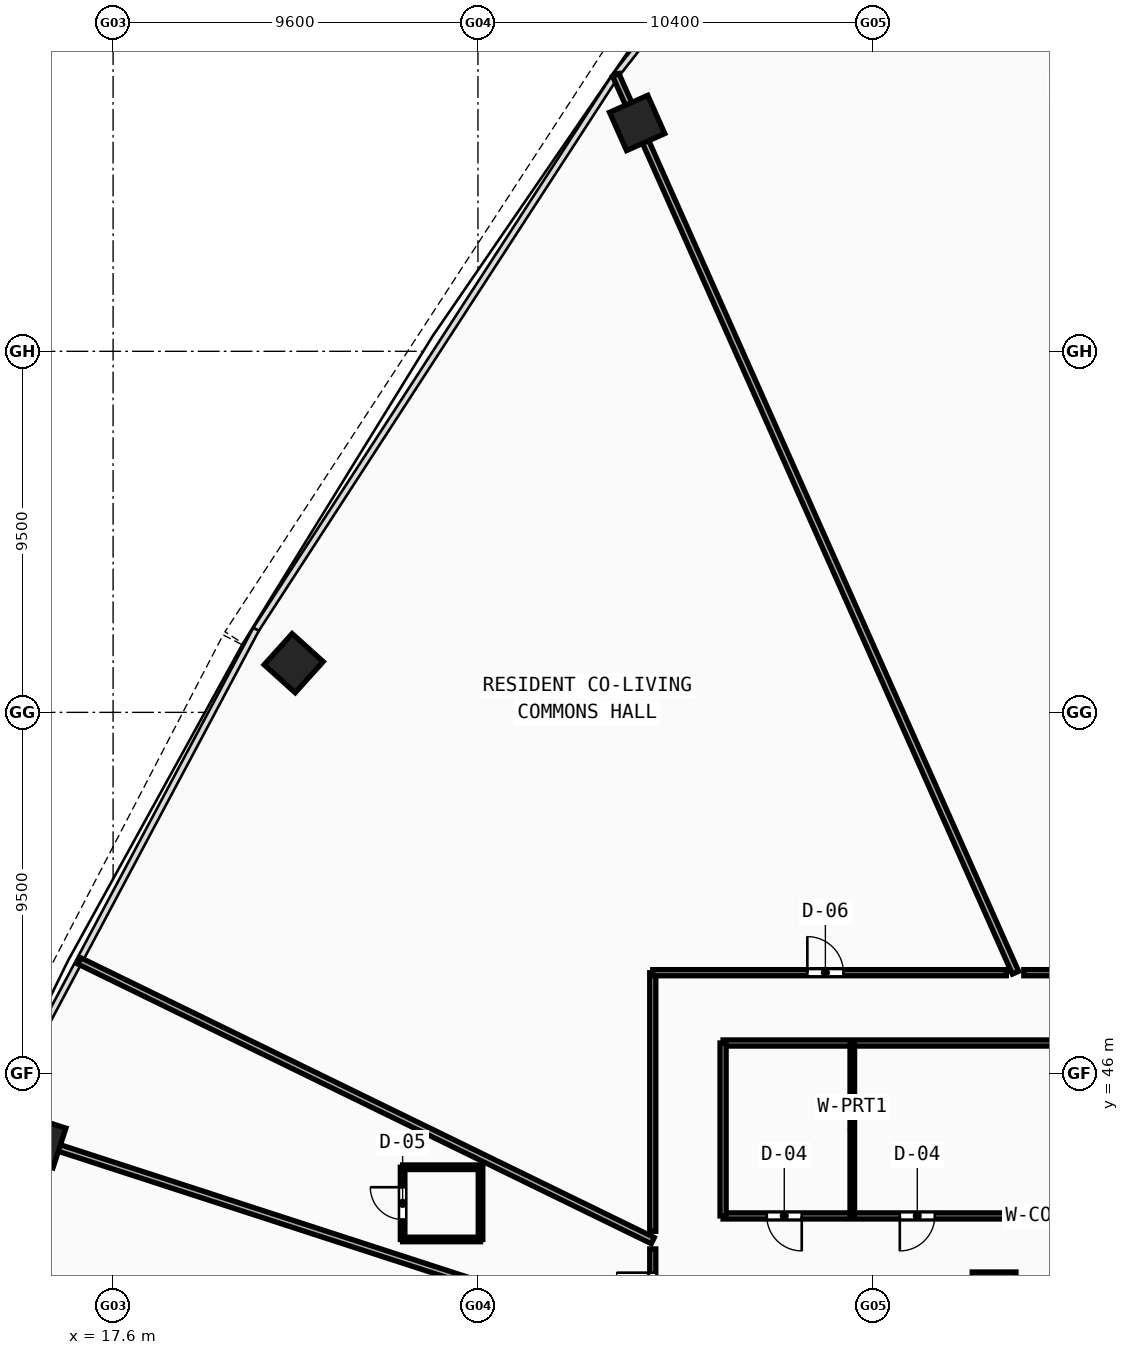
"""IFC4 building model, lengths in metres.
Left out: names, types, materials, properties, quantities, classifications, styles, units other than length and angle.
Written with IfcOpenShell. Run it as: python <this file> out.ifc"""

import sys

from ifc_helpers import new_model, si_unit, direction, frame, frame_2d, origin, origin_with_axes, origin_2d, place, context, subcontext, project, spatial, rectangle, hollow_rectangle, extrude, source, transform, mapped, element, fill, save


model = new_model("IFC4")
c1 = context("Model", 3, precision=1e-05, world=origin(), true_north=direction((0.0, 1.0)))
c2 = subcontext(c1, "Body", "Model", "MODEL_VIEW")
j1 = project(units=[si_unit("LENGTHUNIT", "METRE"), si_unit("PLANEANGLEUNIT", "RADIAN")], contexts=[c1])
p1 = place(None, origin())
s1 = spatial("IfcSite", under=j1, at=p1, CompositionType="ELEMENT")
p2 = place(p1, origin())
s2 = spatial("IfcBuilding", under=s1, at=p2, CompositionType="ELEMENT")
p3 = place(p2, frame((0.0, 0.0, 55.81)))
s3 = spatial("IfcBuildingStorey", under=s2, at=p3, CompositionType="ELEMENT", Elevation=55.81)
m1 = source(origin(), c2, "Body", "SweptSolid", [
    extrude(hollow_rectangle(XDim=1.15, YDim=1.15, WallThickness=0.048, at=origin_2d()), origin(), (0.0, 0.0, 1.0), 3.63),
])
p4 = place(p3, frame((40.781, 40.2, -0.26), z_axis=(0.0, 0.0, 1.0), x_axis=(1.0, 0.0, 0.0)))
e1 = element("IfcColumn", 1, at=p4, inside=s3, PredefinedType="COLUMN", context=c2, shape_type="MappedRepresentation", body=[
    mapped(m1, transform((0.0, 0.0, 0.0), scale=1.0)),
])
m2 = source(origin(), c2, "Body", "SweptSolid", [
    extrude(hollow_rectangle(XDim=1.1, YDim=1.1, WallThickness=0.045, at=origin_2d()), origin(), (0.0, 0.0, 1.0), 3.63),
])
for number, where, z_axis, x_axis in (
    (2, (31.389, 71.009, -0.26), (0.0, 0.0, 1.0), (-0.914, -0.407, 0.0)),
    (3, (22.351, 56.794, -0.26), (0.0, 0.0, 1.0), (-0.669, -0.743, 0.0)),
    (4, (15.665, 44.206, -0.26), (0.0, 0.0, 1.0), (-0.309, -0.951, 0.0)),
):
    element("IfcColumn", number, at=place(p3, frame(where, z_axis=z_axis, x_axis=x_axis)), inside=s3, PredefinedType="COLUMN", context=c2, shape_type="MappedRepresentation", body=[
        mapped(m2, transform((0.0, 0.0, 0.0), scale=1.0)),
    ])
p5 = place(p3, frame((33.65, 42.25, 0.0), z_axis=(0.0, 0.0, 1.0), x_axis=(1.0, 0.0, 0.0)))
e5 = element("IfcWall", 5, at=p5, inside=s3, PredefinedType="PARTITIONING", context=c2, shape_type="SweptSolid", body=[
    extrude(rectangle(XDim=10.23, YDim=0.16, at=frame_2d((5.115, 0.0))), origin(), (0.0, 0.0, 1.0), 2.67),
])
p6 = place(p5, frame((1.15, 0.0, 0.0)))
e6 = element("IfcOpeningElement", 6, at=p6, cuts=e5, PredefinedType="OPENING", context=c2, shape_type="SweptSolid", body=[
    extrude(rectangle(XDim=0.92, YDim=2.1, at=frame_2d((0.46, 1.05))), frame((0.0, 0.09, 0.0), z_axis=(0.0, -1.0, 0.0), x_axis=(1.0, 0.0, 0.0)), (0.0, 0.0, 1.0), 0.18),
])
p7 = place(p5, frame((4.65, 0.0, 0.0)))
e7 = element("IfcOpeningElement", 7, at=p7, cuts=e5, PredefinedType="OPENING", context=c2, shape_type="SweptSolid", body=[
    extrude(rectangle(XDim=0.92, YDim=2.1, at=frame_2d((0.46, 1.05))), frame((0.0, 0.09, 0.0), z_axis=(0.0, -1.0, 0.0), x_axis=(1.0, 0.0, 0.0)), (0.0, 0.0, 1.0), 0.18),
])
p8 = place(p3, frame((33.65, 46.8, 0.0), z_axis=(0.0, 0.0, 1.0), x_axis=(1.0, 0.0, 0.0)))
e8 = element("IfcWall", 8, at=p8, inside=s3, PredefinedType="PARTITIONING", context=c2, shape_type="SweptSolid", body=[
    extrude(rectangle(XDim=10.23, YDim=0.16, at=frame_2d((5.115, 0.0))), origin(), (0.0, 0.0, 1.0), 2.67),
])
p9 = place(p3, frame((33.65, 42.25, 0.0), z_axis=(0.0, 0.0, 1.0), x_axis=(0.0, 1.0, 0.0)))
e9 = element("IfcWall", 9, at=p9, inside=s3, PredefinedType="PARTITIONING", context=c2, shape_type="SweptSolid", body=[
    extrude(rectangle(XDim=4.55, YDim=0.16, at=frame_2d((2.275, 0.0))), origin(), (0.0, 0.0, 1.0), 2.67),
])
p10 = place(p3, frame((37.05, 42.25, 0.0), z_axis=(0.0, 0.0, 1.0), x_axis=(0.0, 1.0, 0.0)))
e10 = element("IfcWall", 10, at=p10, inside=s3, PredefinedType="PARTITIONING", context=c2, shape_type="SweptSolid", body=[
    extrude(rectangle(XDim=4.55, YDim=0.12, at=frame_2d((2.275, 0.0))), origin(), (0.0, 0.0, 1.0), 2.67),
])
p11 = place(p3, frame((41.344, 48.65, 0.0), z_axis=(0.0, 0.0, 1.0), x_axis=(-0.406729800422, 0.913548504158, 0.0)))
e11 = element("IfcWall", 11, at=p11, inside=s3, PredefinedType="PARTITIONING", context=c2, shape_type="SweptSolid", body=[
    extrude(rectangle(XDim=25.854, YDim=0.18, at=frame_2d((12.927, 0.0))), origin(), (0.0, 0.0, 1.0), 2.67),
])
p12 = place(p3, frame((31.8, 41.601, 0.0), z_axis=(0.0, 0.0, 1.0), x_axis=(-0.898795978277, 0.438367185625, 0.0)))
e12 = element("IfcWall", 12, at=p12, inside=s3, PredefinedType="PARTITIONING", context=c2, shape_type="SweptSolid", body=[
    extrude(rectangle(XDim=16.788, YDim=0.18, at=frame_2d((8.394, 0.0))), origin(), (0.0, 0.0, 1.0), 2.67),
])
p13 = place(p3, frame((31.8, 38.964, 0.0), z_axis=(0.0, 0.0, 1.0), x_axis=(-0.951052304058, 0.309029958006, 0.0)))
e13 = element("IfcWall", 13, at=p13, inside=s3, PredefinedType="PARTITIONING", context=c2, shape_type="SweptSolid", body=[
    extrude(rectangle(XDim=18.299, YDim=0.18, at=frame_2d((9.149, 0.0))), origin(), (0.0, 0.0, 1.0), 2.67),
])
p14 = place(p3, frame((31.8, 39.195, 0.0), z_axis=(0.0, 0.0, 1.0), x_axis=(0.0, 1.0, 0.0)))
e14 = element("IfcWall", 14, at=p14, inside=s3, PredefinedType="PARTITIONING", context=c2, shape_type="SweptSolid", body=[
    extrude(rectangle(XDim=2.187, YDim=0.16, at=frame_2d((1.093, 0.0))), origin(), (0.0, 0.0, 1.0), 3.37),
])
p15 = place(p14, frame((0.613, 0.0, 0.0)))
e15 = element("IfcOpeningElement", 15, at=p15, cuts=e14, PredefinedType="OPENING", context=c2, shape_type="SweptSolid", body=[
    extrude(rectangle(XDim=0.95, YDim=2.1, at=frame_2d((0.475, 1.05))), frame((0.0, 0.09, 0.0), z_axis=(0.0, -1.0, 0.0), x_axis=(1.0, 0.0, 0.0)), (0.0, 0.0, 1.0), 0.18),
])
p16 = place(p3, frame((31.8, 41.846, 0.0), z_axis=(0.0, 0.0, 1.0), x_axis=(0.0, 1.0, 0.0)))
e16 = element("IfcWall", 16, at=p16, inside=s3, PredefinedType="PARTITIONING", context=c2, shape_type="SweptSolid", body=[
    extrude(rectangle(XDim=6.804, YDim=0.16, at=frame_2d((3.402, 0.0))), origin(), (0.0, 0.0, 1.0), 2.67),
])
p17 = place(p3, frame((31.8, 48.65, 0.0), z_axis=(0.0, 0.0, 1.0), x_axis=(1.0, 0.0, 0.0)))
e17 = element("IfcWall", 17, at=p17, inside=s3, PredefinedType="PARTITIONING", context=c2, shape_type="SweptSolid", body=[
    extrude(rectangle(XDim=9.303, YDim=0.16, at=frame_2d((4.651, 0.0))), origin(), (0.0, 0.0, 1.0), 2.97),
])
p18 = place(p17, frame((4.067, 0.0, 0.0)))
e18 = element("IfcOpeningElement", 18, at=p18, cuts=e17, PredefinedType="OPENING", context=c2, shape_type="SweptSolid", body=[
    extrude(rectangle(XDim=0.95, YDim=2.1, at=frame_2d((0.475, 1.05))), frame((0.0, 0.09, 0.0), z_axis=(0.0, -1.0, 0.0), x_axis=(1.0, 0.0, 0.0)), (0.0, 0.0, 1.0), 0.18),
])
p19 = place(p3, frame((41.564, 48.65, 0.0), z_axis=(0.0, 0.0, 1.0), x_axis=(1.0, 0.0, 0.0)))
e19 = element("IfcWall", 19, at=p19, inside=s3, PredefinedType="PARTITIONING", context=c2, shape_type="SweptSolid", body=[
    extrude(rectangle(XDim=2.386, YDim=0.16, at=frame_2d((1.193, 0.0))), origin(), (0.0, 0.0, 1.0), 2.67),
])
p20 = place(p3, frame((25.218, 41.631, 0.0), z_axis=(0.0, 0.0, 1.0), x_axis=(1.0, 0.0, 0.0)))
e20 = element("IfcWall", 20, at=p20, inside=s3, PredefinedType="PARTITIONING", context=c2, shape_type="SweptSolid", body=[
    extrude(rectangle(XDim=2.05, YDim=0.12, at=frame_2d((1.025, 0.0))), origin(), (0.0, 0.0, 1.0), 3.37),
])
p21 = place(p3, frame((27.268, 41.631, 0.0), z_axis=(0.0, 0.0, 1.0), x_axis=(0.0, 1.0, 0.0)))
e21 = element("IfcWall", 21, at=p21, inside=s3, PredefinedType="PARTITIONING", context=c2, shape_type="SweptSolid", body=[
    extrude(rectangle(XDim=1.9, YDim=0.12, at=frame_2d((0.95, 0.0))), origin(), (0.0, 0.0, 1.0), 3.37),
])
p22 = place(p3, frame((27.268, 43.531, 0.0), z_axis=(0.0, 0.0, 1.0), x_axis=(-1.0, 0.0, 0.0)))
e22 = element("IfcWall", 22, at=p22, inside=s3, PredefinedType="PARTITIONING", context=c2, shape_type="SweptSolid", body=[
    extrude(rectangle(XDim=2.05, YDim=0.12, at=frame_2d((1.025, 0.0))), origin(), (0.0, 0.0, 1.0), 3.37),
])
p23 = place(p3, frame((25.218, 43.531, 0.0), z_axis=(0.0, 0.0, 1.0), x_axis=(0.0, -1.0, 0.0)))
e23 = element("IfcWall", 23, at=p23, inside=s3, PredefinedType="PARTITIONING", context=c2, shape_type="SweptSolid", body=[
    extrude(rectangle(XDim=1.9, YDim=0.12, at=frame_2d((0.95, 0.0))), origin(), (0.0, 0.0, 1.0), 3.37),
])
p24 = place(p23, frame((0.525, 0.0, 0.0)))
e24 = element("IfcOpeningElement", 24, at=p24, cuts=e23, PredefinedType="OPENING", context=c2, shape_type="SweptSolid", body=[
    extrude(rectangle(XDim=0.85, YDim=2.1, at=frame_2d((0.425, 1.05))), frame((0.0, 0.07, 0.0), z_axis=(0.0, -1.0, 0.0), x_axis=(1.0, 0.0, 0.0)), (0.0, 0.0, 1.0), 0.14),
])
m3 = source(origin(), c2, "Body", "SweptSolid", [
    extrude(rectangle(XDim=0.92, YDim=2.1, at=frame_2d((0.46, 1.05))), frame((0.0, 0.025, 0.0), z_axis=(0.0, -1.0, 0.0), x_axis=(1.0, 0.0, 0.0)), (0.0, 0.0, 1.0), 0.05),
])
p25 = place(p6, frame((0.92, 0.0, 0.0), z_axis=(0.0, 0.0, 1.0), x_axis=(-1.0, 0.0, 0.0)))
e25 = element("IfcDoor", 25, at=p25, inside=s3, OperationType="SINGLE_SWING_LEFT", PredefinedType="DOOR", context=c2, shape_type="MappedRepresentation", body=[
    mapped(m3, transform((0.0, 0.0, 0.0), scale=1.0)),
])
fill(e6, e25)
p26 = place(p7, frame((0.92, 0.0, 0.0), z_axis=(0.0, 0.0, 1.0), x_axis=(-1.0, 0.0, 0.0)))
e26 = element("IfcDoor", 26, at=p26, inside=s3, OperationType="SINGLE_SWING_RIGHT", PredefinedType="DOOR", context=c2, shape_type="MappedRepresentation", body=[
    mapped(m3, transform((0.0, 0.0, 0.0), scale=1.0)),
])
fill(e7, e26)
m4 = source(origin(), c2, "Body", "SweptSolid", [
    extrude(rectangle(XDim=0.95, YDim=2.1, at=frame_2d((0.475, 1.05))), frame((0.0, 0.025, 0.0), z_axis=(0.0, -1.0, 0.0), x_axis=(1.0, 0.0, 0.0)), (0.0, 0.0, 1.0), 0.05),
])
p27 = place(p18, origin_with_axes())
e27 = element("IfcDoor", 27, at=p27, inside=s3, OperationType="SINGLE_SWING_LEFT", PredefinedType="DOOR", context=c2, shape_type="MappedRepresentation", body=[
    mapped(m4, transform((0.0, 0.0, 0.0), scale=1.0)),
])
fill(e18, e27)
p28 = place(p15, origin_with_axes())
e28 = element("IfcDoor", 28, at=p28, inside=s3, OperationType="SINGLE_SWING_RIGHT", PredefinedType="DOOR", context=c2, shape_type="MappedRepresentation", body=[
    mapped(m4, transform((0.0, 0.0, 0.0), scale=1.0)),
])
fill(e15, e28)
m5 = source(origin(), c2, "Body", "SweptSolid", [
    extrude(rectangle(XDim=0.85, YDim=2.1, at=frame_2d((0.425, 1.05))), frame((0.0, 0.025, 0.0), z_axis=(0.0, -1.0, 0.0), x_axis=(1.0, 0.0, 0.0)), (0.0, 0.0, 1.0), 0.05),
])
p29 = place(p24, frame((0.85, 0.0, 0.0), z_axis=(0.0, 0.0, 1.0), x_axis=(-1.0, 0.0, 0.0)))
e29 = element("IfcDoor", 29, at=p29, inside=s3, OperationType="SINGLE_SWING_RIGHT", PredefinedType="DOOR", context=c2, shape_type="MappedRepresentation", body=[
    mapped(m5, transform((0.0, 0.0, 0.0), scale=1.0)),
])
fill(e24, e29)
save(model, sys.argv[1])
